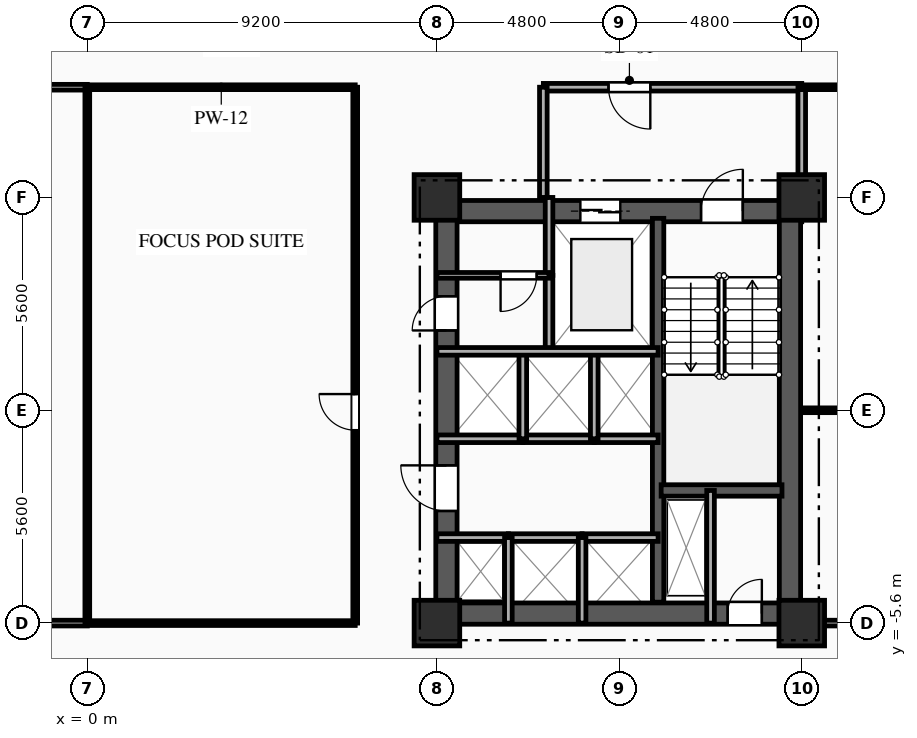
"""IFC4 building model, lengths in metres.
Left out: names, types, materials, properties, quantities, classifications, styles, units other than length and angle.
Written with IfcOpenShell. Run it as: python <this file> out.ifc"""

import sys

from ifc_helpers import new_model, si_unit, direction, frame, frame_2d, origin, origin_2d, place, context, subcontext, project, spatial, rectangle, extrude, element, fill, save


model = new_model("IFC4")
c1 = context("Model", 3, precision=1e-05, world=origin(), true_north=direction((0.0, 1.0)))
c2 = subcontext(c1, "Body", "Model", "MODEL_VIEW")
j1 = project(units=[si_unit("LENGTHUNIT", "METRE"), si_unit("PLANEANGLEUNIT", "RADIAN")], contexts=[c1])
p1 = place(None, origin())
s1 = spatial("IfcSite", under=j1, at=p1, CompositionType="ELEMENT")
p2 = place(p1, origin())
s2 = spatial("IfcBuilding", under=s1, at=p2, CompositionType="ELEMENT")
p3 = place(p2, frame((0.0, 0.0, 70.55)))
s3 = spatial("IfcBuildingStorey", under=s2, at=p3, CompositionType="ELEMENT", Elevation=70.55)
for number, where, z_axis, x_axis in (
    (1, (9.2, -5.6, 0.0), (0.0, 0.0, 1.0), (1.0, 0.0, 0.0)),
    (2, (9.2, 5.6, 0.0), (0.0, 0.0, 1.0), (1.0, 0.0, 0.0)),
    (3, (18.8, -5.6, 0.0), (0.0, 0.0, 1.0), (1.0, 0.0, 0.0)),
    (4, (18.8, 5.6, 0.0), (0.0, 0.0, 1.0), (1.0, 0.0, 0.0)),
):
    element("IfcColumn", number, at=place(p3, frame(where, z_axis=z_axis, x_axis=x_axis)), inside=s3, PredefinedType="COLUMN", context=c2, shape_type="SweptSolid", body=[
        extrude(rectangle(XDim=1.2, YDim=1.2, at=origin_2d()), origin(), (0.0, 0.0, 1.0), 3.35),
    ])
p4 = place(p3, frame((9.2, 5.24, 0.0), z_axis=(0.0, 0.0, 1.0), x_axis=(1.0, 0.0, 0.0)))
e5 = element("IfcWall", 5, at=p4, inside=s3, PredefinedType="SHEAR", context=c2, shape_type="SweptSolid", body=[
    extrude(rectangle(XDim=9.6, YDim=0.56, at=frame_2d((4.8, 0.0))), origin(), (0.0, 0.0, 1.0), 3.0),
])
p5 = place(p4, frame((6.95, 0.0, 0.0)))
e6 = element("IfcOpeningElement", 6, at=p5, cuts=e5, PredefinedType="OPENING", context=c2, shape_type="SweptSolid", body=[
    extrude(rectangle(XDim=1.1, YDim=2.15, at=frame_2d((0.55, 1.075))), frame((0.0, 0.29, 0.0), z_axis=(0.0, -1.0, 0.0), x_axis=(1.0, 0.0, 0.0)), (0.0, 0.0, 1.0), 0.58),
])
p6 = place(p4, frame((3.775, 0.0, 0.0)))
e7 = element("IfcOpeningElement", 7, at=p6, cuts=e5, PredefinedType="OPENING", context=c2, shape_type="SweptSolid", body=[
    extrude(rectangle(XDim=1.05, YDim=2.1, at=frame_2d((0.525, 1.05))), frame((0.0, 0.29, 0.0), z_axis=(0.0, -1.0, 0.0), x_axis=(1.0, 0.0, 0.0)), (0.0, 0.0, 1.0), 0.58),
])
p7 = place(p3, frame((9.2, -5.35, 0.0), z_axis=(0.0, 0.0, 1.0), x_axis=(1.0, 0.0, 0.0)))
e8 = element("IfcWall", 8, at=p7, inside=s3, PredefinedType="SHEAR", context=c2, shape_type="SweptSolid", body=[
    extrude(rectangle(XDim=9.6, YDim=0.56, at=frame_2d((4.8, 0.0))), origin(), (0.0, 0.0, 1.0), 3.0),
])
p8 = place(p7, frame((7.65, 0.0, 0.0)))
e9 = element("IfcOpeningElement", 9, at=p8, cuts=e8, PredefinedType="OPENING", context=c2, shape_type="SweptSolid", body=[
    extrude(rectangle(XDim=0.9, YDim=2.1, at=frame_2d((0.45, 1.05))), frame((0.0, 0.29, 0.0), z_axis=(0.0, -1.0, 0.0), x_axis=(1.0, 0.0, 0.0)), (0.0, 0.0, 1.0), 0.58),
])
p9 = place(p3, frame((9.45, -5.05, 0.0), z_axis=(0.0, 0.0, 1.0), x_axis=(0.0, 1.0, 0.0)))
e10 = element("IfcWall", 10, at=p9, inside=s3, PredefinedType="SHEAR", context=c2, shape_type="SweptSolid", body=[
    extrude(rectangle(XDim=10.1, YDim=0.56, at=frame_2d((5.05, 0.0))), origin(), (0.0, 0.0, 1.0), 3.0),
])
p10 = place(p9, frame((7.15, 0.0, 0.0)))
e11 = element("IfcOpeningElement", 11, at=p10, cuts=e10, PredefinedType="OPENING", context=c2, shape_type="SweptSolid", body=[
    extrude(rectangle(XDim=0.9, YDim=2.1, at=frame_2d((0.45, 1.05))), frame((0.0, 0.29, 0.0), z_axis=(0.0, -1.0, 0.0), x_axis=(1.0, 0.0, 0.0)), (0.0, 0.0, 1.0), 0.58),
])
p11 = place(p9, frame((2.4, 0.0, 0.0)))
e12 = element("IfcOpeningElement", 12, at=p11, cuts=e10, PredefinedType="OPENING", context=c2, shape_type="SweptSolid", body=[
    extrude(rectangle(XDim=1.2, YDim=2.15, at=frame_2d((0.6, 1.075))), frame((0.0, 0.29, 0.0), z_axis=(0.0, -1.0, 0.0), x_axis=(1.0, 0.0, 0.0)), (0.0, 0.0, 1.0), 0.58),
])
p12 = place(p3, frame((18.49, -5.05, 0.0), z_axis=(0.0, 0.0, 1.0), x_axis=(0.0, 1.0, 0.0)))
e13 = element("IfcWall", 13, at=p12, inside=s3, PredefinedType="SHEAR", context=c2, shape_type="SweptSolid", body=[
    extrude(rectangle(XDim=10.1, YDim=0.56, at=frame_2d((5.05, 0.0))), origin(), (0.0, 0.0, 1.0), 3.0),
])
p13 = place(p3, frame((15.02, -5.05, 0.0), z_axis=(0.0, 0.0, 1.0), x_axis=(0.0, 1.0, 0.0)))
e14 = element("IfcWall", 14, at=p13, inside=s3, PredefinedType="SHEAR", context=c2, shape_type="SweptSolid", body=[
    extrude(rectangle(XDim=10.1, YDim=0.3, at=frame_2d((5.05, 0.0))), origin(), (0.0, 0.0, 1.0), 3.0),
])
p14 = place(p3, frame((15.1, -2.11, 0.0), z_axis=(0.0, 0.0, 1.0), x_axis=(1.0, 0.0, 0.0)))
e15 = element("IfcWall", 15, at=p14, inside=s3, PredefinedType="SHEAR", context=c2, shape_type="SweptSolid", body=[
    extrude(rectangle(XDim=3.18, YDim=0.3, at=frame_2d((1.59, 0.0))), origin(), (0.0, 0.0, 1.0), 3.0),
])
p15 = place(p3, frame((16.4, -2.11, 0.0), z_axis=(0.0, 0.0, 1.0), x_axis=(0.0, -1.0, 0.0)))
e16 = element("IfcWall", 16, at=p15, inside=s3, PredefinedType="PARTITIONING", context=c2, shape_type="SweptSolid", body=[
    extrude(rectangle(XDim=3.49, YDim=0.2, at=frame_2d((1.745, 0.0))), origin(), (0.0, 0.0, 1.0), 3.0),
])
p16 = place(p3, frame((12.15, 3.55, 0.0), z_axis=(0.0, 0.0, 1.0), x_axis=(0.0, -1.0, 0.0)))
e17 = element("IfcWall", 17, at=p16, inside=s3, PredefinedType="PARTITIONING", context=c2, shape_type="SweptSolid", body=[
    extrude(rectangle(XDim=2.0, YDim=0.2, at=frame_2d((1.0, 0.0))), origin(), (0.0, 0.0, 1.0), 3.0),
])
p17 = place(p3, frame((12.15, 5.6, 0.0), z_axis=(0.0, 0.0, 1.0), x_axis=(0.0, -1.0, 0.0)))
e18 = element("IfcWall", 18, at=p17, inside=s3, PredefinedType="PARTITIONING", context=c2, shape_type="SweptSolid", body=[
    extrude(rectangle(XDim=2.05, YDim=0.2, at=frame_2d((1.025, 0.0))), origin(), (0.0, 0.0, 1.0), 3.0),
])
p18 = place(p3, frame((18.8, 8.5, 0.0), z_axis=(0.0, 0.0, 1.0), x_axis=(-1.0, 0.0, 0.0)))
e19 = element("IfcWall", 19, at=p18, inside=s3, PredefinedType="PARTITIONING", context=c2, shape_type="SweptSolid", body=[
    extrude(rectangle(XDim=6.8, YDim=0.2, at=frame_2d((3.4, 0.0))), origin(), (0.0, 0.0, 1.0), 3.0),
])
p19 = place(p18, frame((3.985, 0.0, 0.0)))
e20 = element("IfcOpeningElement", 20, at=p19, cuts=e19, PredefinedType="OPENING", context=c2, shape_type="SweptSolid", body=[
    extrude(rectangle(XDim=1.1, YDim=2.15, at=frame_2d((0.55, 1.075))), frame((0.0, 0.11, 0.0), z_axis=(0.0, -1.0, 0.0), x_axis=(1.0, 0.0, 0.0)), (0.0, 0.0, 1.0), 0.22),
])
p20 = place(p3, frame((12.0, 8.5, 0.0), z_axis=(0.0, 0.0, 1.0), x_axis=(0.0, -1.0, 0.0)))
e21 = element("IfcWall", 21, at=p20, inside=s3, PredefinedType="PARTITIONING", context=c2, shape_type="SweptSolid", body=[
    extrude(rectangle(XDim=2.9, YDim=0.2, at=frame_2d((1.45, 0.0))), origin(), (0.0, 0.0, 1.0), 3.0),
])
p21 = place(p3, frame((18.8, 5.6, 0.0), z_axis=(0.0, 0.0, 1.0), x_axis=(0.0, 1.0, 0.0)))
e22 = element("IfcWall", 22, at=p21, inside=s3, PredefinedType="PARTITIONING", context=c2, shape_type="SweptSolid", body=[
    extrude(rectangle(XDim=2.9, YDim=0.2, at=frame_2d((1.45, 0.0))), origin(), (0.0, 0.0, 1.0), 2.485),
])
p22 = place(p3, frame((12.15, 3.55, 0.0), z_axis=(0.0, 0.0, 1.0), x_axis=(-1.0, 0.0, 0.0)))
e23 = element("IfcWall", 23, at=p22, inside=s3, PredefinedType="PARTITIONING", context=c2, shape_type="SweptSolid", body=[
    extrude(rectangle(XDim=2.95, YDim=0.15, at=frame_2d((1.475, 0.0))), origin(), (0.0, 0.0, 1.0), 3.0),
])
p23 = place(p22, frame((0.325, 0.0, 0.0)))
e24 = element("IfcOpeningElement", 24, at=p23, cuts=e23, PredefinedType="OPENING", context=c2, shape_type="SweptSolid", body=[
    extrude(rectangle(XDim=0.95, YDim=2.1, at=frame_2d((0.475, 1.05))), frame((0.0, 0.085, 0.0), z_axis=(0.0, -1.0, 0.0), x_axis=(1.0, 0.0, 0.0)), (0.0, 0.0, 1.0), 0.17),
])
p24 = place(p3, frame((9.2, -3.35, 0.0), z_axis=(0.0, 0.0, 1.0), x_axis=(1.0, 0.0, 0.0)))
e25 = element("IfcWall", 25, at=p24, inside=s3, PredefinedType="PARTITIONING", context=c2, shape_type="SweptSolid", body=[
    extrude(rectangle(XDim=1.88, YDim=0.2, at=frame_2d((0.94, 0.0))), origin(), (0.0, 0.0, 1.0), 2.715),
])
p25 = place(p3, frame((11.08, -3.35, 0.0), z_axis=(0.0, 0.0, 1.0), x_axis=(1.0, 0.0, 0.0)))
e26 = element("IfcWall", 26, at=p25, inside=s3, PredefinedType="PARTITIONING", context=c2, shape_type="SweptSolid", body=[
    extrude(rectangle(XDim=1.94, YDim=0.2, at=frame_2d((0.97, 0.0))), origin(), (0.0, 0.0, 1.0), 3.0),
])
p26 = place(p3, frame((13.02, -3.35, 0.0), z_axis=(0.0, 0.0, 1.0), x_axis=(1.0, 0.0, 0.0)))
e27 = element("IfcWall", 27, at=p26, inside=s3, PredefinedType="PARTITIONING", context=c2, shape_type="SweptSolid", body=[
    extrude(rectangle(XDim=2.0, YDim=0.2, at=frame_2d((1.0, 0.0))), origin(), (0.0, 0.0, 1.0), 3.0),
])
p27 = place(p3, frame((11.46, -0.75, 0.0), z_axis=(0.0, 0.0, 1.0), x_axis=(-1.0, 0.0, 0.0)))
e28 = element("IfcWall", 28, at=p27, inside=s3, PredefinedType="PARTITIONING", context=c2, shape_type="SweptSolid", body=[
    extrude(rectangle(XDim=2.26, YDim=0.2, at=frame_2d((1.13, 0.0))), origin(), (0.0, 0.0, 1.0), 3.0),
])
p28 = place(p3, frame((13.34, -0.75, 0.0), z_axis=(0.0, 0.0, 1.0), x_axis=(-1.0, 0.0, 0.0)))
e29 = element("IfcWall", 29, at=p28, inside=s3, PredefinedType="PARTITIONING", context=c2, shape_type="SweptSolid", body=[
    extrude(rectangle(XDim=1.88, YDim=0.2, at=frame_2d((0.94, 0.0))), origin(), (0.0, 0.0, 1.0), 3.0),
])
p29 = place(p3, frame((15.02, -0.75, 0.0), z_axis=(0.0, 0.0, 1.0), x_axis=(-1.0, 0.0, 0.0)))
e30 = element("IfcWall", 30, at=p29, inside=s3, PredefinedType="PARTITIONING", context=c2, shape_type="SweptSolid", body=[
    extrude(rectangle(XDim=1.68, YDim=0.2, at=frame_2d((0.84, 0.0))), origin(), (0.0, 0.0, 1.0), 3.0),
])
for number, where, z_axis, x_axis in (
    (31, (11.08, -5.6, 0.0), (0.0, 0.0, 1.0), (0.0, 1.0, 0.0)),
    (32, (13.02, -5.6, 0.0), (0.0, 0.0, 1.0), (0.0, 1.0, 0.0)),
):
    element("IfcWall", number, at=place(p3, frame(where, z_axis=z_axis, x_axis=x_axis)), inside=s3, PredefinedType="PARTITIONING", context=c2, shape_type="SweptSolid", body=[
        extrude(rectangle(XDim=2.25, YDim=0.2, at=frame_2d((1.125, 0.0))), origin(), (0.0, 0.0, 1.0), 3.0),
    ])
for number, where, z_axis, x_axis in (
    (33, (11.46, -0.75, 0.0), (0.0, 0.0, 1.0), (0.0, 1.0, 0.0)),
    (34, (13.34, -0.75, 0.0), (0.0, 0.0, 1.0), (0.0, 1.0, 0.0)),
):
    element("IfcWall", number, at=place(p3, frame(where, z_axis=z_axis, x_axis=x_axis)), inside=s3, PredefinedType="PARTITIONING", context=c2, shape_type="SweptSolid", body=[
        extrude(rectangle(XDim=2.3, YDim=0.2, at=frame_2d((1.15, 0.0))), origin(), (0.0, 0.0, 1.0), 3.0),
    ])
p30 = place(p3, frame((0.0, 8.5, 0.0), z_axis=(0.0, 0.0, 1.0), x_axis=(-1.0, 0.0, 0.0)))
e35 = element("IfcWall", 35, at=p30, inside=s3, PredefinedType="PARTITIONING", context=c2, shape_type="SweptSolid", body=[
    extrude(rectangle(XDim=7.05, YDim=0.15, at=frame_2d((3.525, 0.0))), origin(), (0.0, 0.0, 1.0), 3.0),
])
p31 = place(p3, frame((23.0, 8.5, 0.0), z_axis=(0.0, 0.0, 1.0), x_axis=(-1.0, 0.0, 0.0)))
e36 = element("IfcWall", 36, at=p31, inside=s3, PredefinedType="PARTITIONING", context=c2, shape_type="SweptSolid", body=[
    extrude(rectangle(XDim=4.2, YDim=0.125, at=frame_2d((2.1, 0.0))), origin(), (0.0, 0.0, 1.0), 3.0),
])
p32 = place(p31, frame((0.841, 0.0, 0.0)))
e37 = element("IfcOpeningElement", 37, at=p32, cuts=e36, PredefinedType="OPENING", context=c2, shape_type="SweptSolid", body=[
    extrude(rectangle(XDim=0.95, YDim=2.1, at=frame_2d((0.475, 1.05))), frame((0.0, 0.073, 0.0), z_axis=(0.0, -1.0, 0.0), x_axis=(1.0, 0.0, 0.0)), (0.0, 0.0, 1.0), 0.145),
])
p33 = place(p3, frame((7.05, 8.5, 0.0), z_axis=(0.0, 0.0, 1.0), x_axis=(-1.0, 0.0, 0.0)))
e38 = element("IfcWall", 38, at=p33, inside=s3, PredefinedType="PARTITIONING", context=c2, shape_type="SweptSolid", body=[
    extrude(rectangle(XDim=7.05, YDim=0.125, at=frame_2d((3.525, 0.0))), origin(), (0.0, 0.0, 1.0), 3.0),
])
p34 = place(p3, frame((-7.05, -5.6, 0.0), z_axis=(0.0, 0.0, 1.0), x_axis=(1.0, 0.0, 0.0)))
e39 = element("IfcWall", 39, at=p34, inside=s3, PredefinedType="PARTITIONING", context=c2, shape_type="SweptSolid", body=[
    extrude(rectangle(XDim=7.05, YDim=0.15, at=frame_2d((3.525, 0.0))), origin(), (0.0, 0.0, 1.0), 2.485),
])
p35 = place(p3, frame((18.8, -5.6, 0.0), z_axis=(0.0, 0.0, 1.0), x_axis=(1.0, 0.0, 0.0)))
e40 = element("IfcWall", 40, at=p35, inside=s3, PredefinedType="PARTITIONING", context=c2, shape_type="SweptSolid", body=[
    extrude(rectangle(XDim=4.2, YDim=0.15, at=frame_2d((2.1, 0.0))), origin(), (0.0, 0.0, 1.0), 3.0),
])
p36 = place(p35, frame((2.321, 0.0, 0.0)))
e41 = element("IfcOpeningElement", 41, at=p36, cuts=e40, PredefinedType="OPENING", context=c2, shape_type="SweptSolid", body=[
    extrude(rectangle(XDim=1.05, YDim=2.15, at=frame_2d((0.525, 1.075))), frame((0.0, 0.085, 0.0), z_axis=(0.0, -1.0, 0.0), x_axis=(1.0, 0.0, 0.0)), (0.0, 0.0, 1.0), 0.17),
])
p37 = place(p3, frame((0.0, -5.6, 0.0), z_axis=(0.0, 0.0, 1.0), x_axis=(1.0, 0.0, 0.0)))
e42 = element("IfcWall", 42, at=p37, inside=s3, PredefinedType="PARTITIONING", context=c2, shape_type="SweptSolid", body=[
    extrude(rectangle(XDim=7.05, YDim=0.125, at=frame_2d((3.525, 0.0))), origin(), (0.0, 0.0, 1.0), 2.485),
])
p38 = place(p3, frame((7.05, -5.6, 0.0), z_axis=(0.0, 0.0, 1.0), x_axis=(0.0, 1.0, 0.0)))
e43 = element("IfcWall", 43, at=p38, inside=s3, PredefinedType="PARTITIONING", context=c2, shape_type="SweptSolid", body=[
    extrude(rectangle(XDim=14.1, YDim=0.125, at=frame_2d((7.05, 0.0))), origin(), (0.0, 0.0, 1.0), 3.0),
])
p39 = place(p38, frame((5.076, 0.0, 0.0)))
e44 = element("IfcOpeningElement", 44, at=p39, cuts=e43, PredefinedType="OPENING", context=c2, shape_type="SweptSolid", body=[
    extrude(rectangle(XDim=0.95, YDim=2.1, at=frame_2d((0.475, 1.05))), frame((0.0, 0.073, 0.0), z_axis=(0.0, -1.0, 0.0), x_axis=(1.0, 0.0, 0.0)), (0.0, 0.0, 1.0), 0.145),
])
p40 = place(p3, frame((18.8, 0.0, 0.0), z_axis=(0.0, 0.0, 1.0), x_axis=(1.0, 0.0, 0.0)))
e45 = element("IfcWall", 45, at=p40, inside=s3, PredefinedType="PARTITIONING", context=c2, shape_type="SweptSolid", body=[
    extrude(rectangle(XDim=14.0, YDim=0.125, at=frame_2d((7.0, 0.0))), origin(), (0.0, 0.0, 1.0), 3.0),
])
p41 = place(p3, frame((0.0, 8.5, 0.0), z_axis=(0.0, 0.0, 1.0), x_axis=(0.0, -1.0, 0.0)))
e46 = element("IfcWall", 46, at=p41, inside=s3, PredefinedType="PARTITIONING", context=c2, shape_type="SweptSolid", body=[
    extrude(rectangle(XDim=14.1, YDim=0.125, at=frame_2d((7.05, 0.0))), origin(), (0.0, 0.0, 1.0), 3.0),
])
p42 = place(p3, frame((9.2, 1.55, 0.0), z_axis=(0.0, 0.0, 1.0), x_axis=(1.0, 0.0, 0.0)))
e47 = element("IfcWall", 47, at=p42, inside=s3, PredefinedType="PARTITIONING", context=c2, shape_type="SweptSolid", body=[
    extrude(rectangle(XDim=5.82, YDim=0.2, at=frame_2d((2.91, 0.0))), origin(), (0.0, 0.0, 1.0), 3.0),
])
p43 = place(p5, origin())
e48 = element("IfcDoor", 48, at=p43, inside=s3, OperationType="SINGLE_SWING_RIGHT", PredefinedType="DOOR", context=c2, shape_type="SweptSolid", body=[
    extrude(rectangle(XDim=1.1, YDim=2.15, at=frame_2d((0.55, 1.075))), frame((0.0, 0.025, 0.0), z_axis=(0.0, -1.0, 0.0), x_axis=(1.0, 0.0, 0.0)), (0.0, 0.0, 1.0), 0.05),
])
fill(e6, e48)
p44 = place(p6, origin())
e49 = element("IfcDoor", 49, at=p44, inside=s3, OperationType="DOUBLE_DOOR_SLIDING", PredefinedType="DOOR", context=c2, shape_type="SweptSolid", body=[
    extrude(rectangle(XDim=1.05, YDim=2.1, at=frame_2d((0.525, 1.05))), frame((0.0, 0.025, 0.0), z_axis=(0.0, -1.0, 0.0), x_axis=(1.0, 0.0, 0.0)), (0.0, 0.0, 1.0), 0.05),
])
fill(e7, e49)
p45 = place(p8, origin())
e50 = element("IfcDoor", 50, at=p45, inside=s3, OperationType="SINGLE_SWING_RIGHT", PredefinedType="DOOR", context=c2, shape_type="SweptSolid", body=[
    extrude(rectangle(XDim=0.9, YDim=2.1, at=frame_2d((0.45, 1.05))), frame((0.0, 0.025, 0.0), z_axis=(0.0, -1.0, 0.0), x_axis=(1.0, 0.0, 0.0)), (0.0, 0.0, 1.0), 0.05),
])
fill(e9, e50)
p46 = place(p19, origin())
e51 = element("IfcDoor", 51, at=p46, inside=s3, OperationType="SINGLE_SWING_LEFT", PredefinedType="DOOR", context=c2, shape_type="SweptSolid", body=[
    extrude(rectangle(XDim=1.1, YDim=2.15, at=frame_2d((0.55, 1.075))), frame((0.0, 0.025, 0.0), z_axis=(0.0, -1.0, 0.0), x_axis=(1.0, 0.0, 0.0)), (0.0, 0.0, 1.0), 0.05),
])
fill(e20, e51)
p47 = place(p23, origin())
e52 = element("IfcDoor", 52, at=p47, inside=s3, OperationType="SINGLE_SWING_RIGHT", PredefinedType="DOOR", context=c2, shape_type="SweptSolid", body=[
    extrude(rectangle(XDim=0.95, YDim=2.1, at=frame_2d((0.475, 1.05))), frame((0.0, 0.025, 0.0), z_axis=(0.0, -1.0, 0.0), x_axis=(1.0, 0.0, 0.0)), (0.0, 0.0, 1.0), 0.05),
])
fill(e24, e52)
p48 = place(p10, origin())
e53 = element("IfcDoor", 53, at=p48, inside=s3, OperationType="SINGLE_SWING_LEFT", PredefinedType="DOOR", context=c2, shape_type="SweptSolid", body=[
    extrude(rectangle(XDim=0.9, YDim=2.1, at=frame_2d((0.45, 1.05))), frame((0.0, 0.025, 0.0), z_axis=(0.0, -1.0, 0.0), x_axis=(1.0, 0.0, 0.0)), (0.0, 0.0, 1.0), 0.05),
])
fill(e11, e53)
p49 = place(p11, origin())
e54 = element("IfcDoor", 54, at=p49, inside=s3, OperationType="SINGLE_SWING_RIGHT", PredefinedType="DOOR", context=c2, shape_type="SweptSolid", body=[
    extrude(rectangle(XDim=1.2, YDim=2.15, at=frame_2d((0.6, 1.075))), frame((0.0, 0.025, 0.0), z_axis=(0.0, -1.0, 0.0), x_axis=(1.0, 0.0, 0.0)), (0.0, 0.0, 1.0), 0.05),
])
fill(e12, e54)
p50 = place(p39, origin())
e55 = element("IfcDoor", 55, at=p50, inside=s3, OperationType="SINGLE_SWING_RIGHT", PredefinedType="DOOR", context=c2, shape_type="SweptSolid", body=[
    extrude(rectangle(XDim=0.95, YDim=2.1, at=frame_2d((0.475, 1.05))), frame((0.0, 0.025, 0.0), z_axis=(0.0, -1.0, 0.0), x_axis=(1.0, 0.0, 0.0)), (0.0, 0.0, 1.0), 0.05),
])
fill(e44, e55)
save(model, sys.argv[1])
